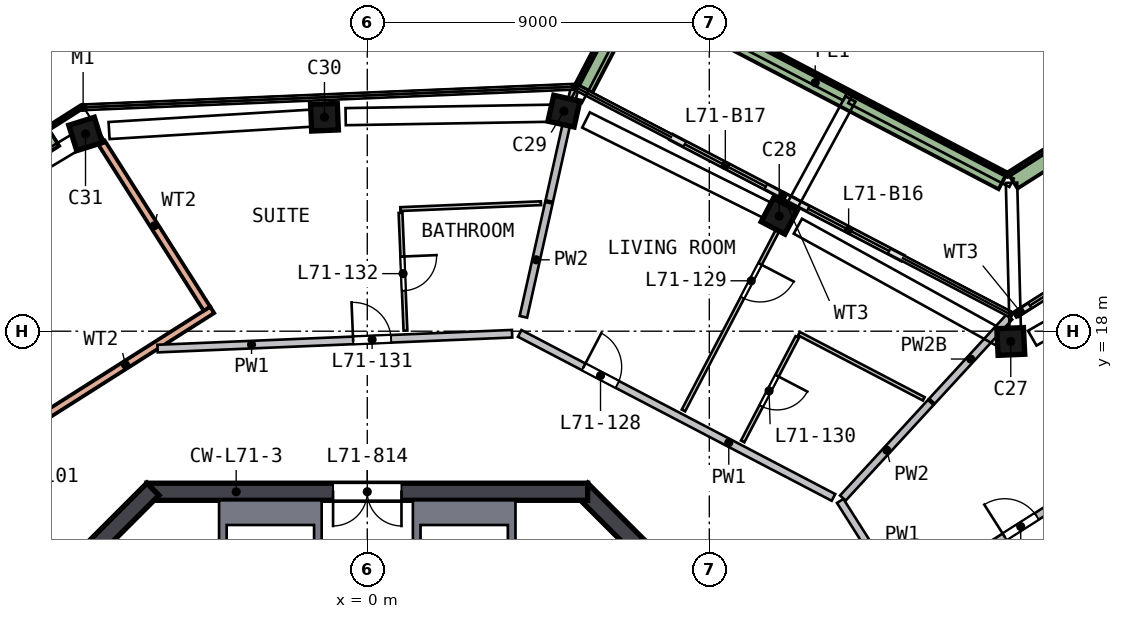
"""IFC4 building model, lengths in metres.
Left out: names, types, materials, properties, quantities, classifications, styles, units other than length and angle.
Written with IfcOpenShell. Run it as: python <this file> out.ifc"""

import sys

from ifc_helpers import new_model, si_unit, direction, frame, frame_2d, origin, origin_2d, place, context, subcontext, project, spatial, polyline, rectangle, outline, extrude, element, fill, save


model = new_model("IFC4")
c1 = context("Model", 3, precision=1e-05, world=origin(), true_north=direction((0.0, 1.0)))
c2 = subcontext(c1, "Body", "Model", "MODEL_VIEW")
j1 = project(units=[si_unit("LENGTHUNIT", "METRE"), si_unit("PLANEANGLEUNIT", "RADIAN")], contexts=[c1])
p1 = place(None, origin())
s1 = spatial("IfcSite", under=j1, at=p1, CompositionType="ELEMENT")
p2 = place(p1, origin())
s2 = spatial("IfcBuilding", under=s1, at=p2, CompositionType="ELEMENT")
p3 = place(p2, frame((0.0, 0.0, 288.0)))
s3 = spatial("IfcBuildingStorey", under=s2, at=p3, CompositionType="ELEMENT", Elevation=288.0)
p4 = place(p3, frame((17.035, 17.633, 0.0), z_axis=(-0.084526714, 0.08019396, 0.993188886), x_axis=(0.995518413, 0.049217624, 0.080750948)))
e1 = element("IfcColumn", 1, at=p4, inside=s3, PredefinedType="COLUMN", context=c2, shape_type="SweptSolid", body=[
    extrude(rectangle(XDim=0.7, YDim=0.7, at=origin_2d()), origin(), (0.0, 0.0, 1.0), 3.212),
])
p5 = place(p3, frame((10.961, 20.966, 0.0), z_axis=(-0.100155575, 0.051332584, 0.993646731), x_axis=(-0.880391875, 0.460700416, -0.112540095)))
e2 = element("IfcColumn", 2, at=p5, inside=s3, PredefinedType="COLUMN", context=c2, shape_type="SweptSolid", body=[
    extrude(rectangle(XDim=0.7, YDim=0.7, at=origin_2d()), origin(), (0.0, 0.0, 1.0), 3.21),
])
p6 = place(p3, frame((5.311, 23.762, 0.0), z_axis=(-0.113193738, 0.024250371, 0.993276949), x_axis=(0.969436955, -0.216314681, 0.115758152)))
e3 = element("IfcColumn", 3, at=p6, inside=s3, PredefinedType="COLUMN", context=c2, shape_type="SweptSolid", body=[
    extrude(rectangle(XDim=0.7, YDim=0.7, at=origin_2d()), origin(), (0.0, 0.0, 1.0), 3.211),
])
p7 = place(p3, frame((-0.991, 23.638, 0.0), z_axis=(-0.112399349, -0.005703621, 0.993646746), x_axis=(-0.992761931, -0.041934524, -0.112539968)))
e4 = element("IfcColumn", 4, at=p7, inside=s3, PredefinedType="COLUMN", context=c2, shape_type="SweptSolid", body=[
    extrude(rectangle(XDim=0.7, YDim=0.7, at=origin_2d()), origin(), (0.0, 0.0, 1.0), 3.21),
])
p8 = place(p3, frame((-7.281, 23.234, 0.0), z_axis=(-0.110228117, -0.035577075, 0.993269366), x_axis=(0.947810585, 0.297052323, 0.115823193)))
e5 = element("IfcColumn", 5, at=p8, inside=s3, PredefinedType="COLUMN", context=c2, shape_type="SweptSolid", body=[
    extrude(rectangle(XDim=0.7, YDim=0.7, at=origin_2d()), origin(), (0.0, 0.0, 1.0), 3.212),
])
p9 = place(p3, frame((13.841, 5.64, 0.0), z_axis=(0.0, 0.0, 1.0), x_axis=(-0.707106781, 0.707106781, 0.0)))
e6 = element("IfcWall", 6, at=p9, inside=s3, PredefinedType="SHEAR", context=c2, shape_type="SweptSolid", body=[
    extrude(rectangle(XDim=11.598, YDim=0.45, at=frame_2d((5.799, 0.0))), origin(), (0.0, 0.0, 1.0), 3.5),
])
p10 = place(p9, frame((2.099, 0.0, 0.0)))
e7 = element("IfcOpeningElement", 7, at=p10, cuts=e6, PredefinedType="OPENING", context=c2, shape_type="SweptSolid", body=[
    extrude(rectangle(XDim=1.2, YDim=2.1, at=frame_2d((0.6, 1.05))), frame((0.0, 0.235, 0.0), z_axis=(0.0, -1.0, 0.0), x_axis=(1.0, 0.0, 0.0)), (0.0, 0.0, 1.0), 0.47),
])
p11 = place(p3, frame((5.799, 13.775, 0.0), z_axis=(0.0, 0.0, 1.0), x_axis=(-1.0, 0.0, 0.0)))
e8 = element("IfcWall", 8, at=p11, inside=s3, PredefinedType="SHEAR", context=c2, shape_type="SweptSolid", body=[
    extrude(rectangle(XDim=11.598, YDim=0.45, at=frame_2d((5.799, 0.0))), origin(), (0.0, 0.0, 1.0), 3.5),
])
p12 = place(p11, frame((4.899, 0.0, 0.0)))
e9 = element("IfcOpeningElement", 9, at=p12, cuts=e8, PredefinedType="OPENING", context=c2, shape_type="SweptSolid", body=[
    extrude(rectangle(XDim=1.8, YDim=2.1, at=frame_2d((0.9, 1.05))), frame((0.0, 0.235, 0.0), z_axis=(0.0, -1.0, 0.0), x_axis=(1.0, 0.0, 0.0)), (0.0, 0.0, 1.0), 0.47),
])
p13 = place(p3, frame((-5.64, 13.841, 0.0), z_axis=(0.0, 0.0, 1.0), x_axis=(-0.707106781, -0.707106781, 0.0)))
e10 = element("IfcWall", 10, at=p13, inside=s3, PredefinedType="SHEAR", context=c2, shape_type="SweptSolid", body=[
    extrude(rectangle(XDim=11.598, YDim=0.45, at=frame_2d((5.799, 0.0))), origin(), (0.0, 0.0, 1.0), 3.5),
])
p14 = place(p3, frame((19.8, 20.175, 0.0), z_axis=(0.0, 0.0, 1.0), x_axis=(-0.844339377, -0.535808751, 0.0)))
e11 = element("IfcWall", 11, at=p14, inside=s3, PredefinedType="SOLIDWALL", context=c2, shape_type="SweptSolid", body=[
    extrude(rectangle(XDim=3.2, YDim=0.15, at=frame_2d((1.6, 0.0))), origin(), (0.0, 0.0, 1.0), 2.525),
])
p15 = place(p14, frame((0.4, 0.0, 0.0)))
e12 = element("IfcOpeningElement", 12, at=p15, cuts=e11, PredefinedType="OPENING", context=c2, shape_type="SweptSolid", body=[
    extrude(rectangle(XDim=2.4, YDim=2.4, at=frame_2d((1.2, 1.2))), frame((0.0, 0.085, 0.0), z_axis=(0.0, -1.0, 0.0), x_axis=(1.0, 0.0, 0.0)), (0.0, 0.0, 1.0), 0.17),
])
p16 = place(p3, frame((14.084, 19.926, 0.0), z_axis=(0.0, 0.0, 1.0), x_axis=(-0.886182685, 0.463336001, 0.0)))
e13 = element("IfcWall", 13, at=p16, inside=s3, PredefinedType="SOLIDWALL", context=c2, shape_type="SweptSolid", body=[
    extrude(rectangle(XDim=3.25, YDim=0.15, at=frame_2d((1.625, 0.0))), origin(), (0.0, 0.0, 1.0), 2.525),
])
p17 = place(p16, frame((0.4, 0.0, 0.0)))
e14 = element("IfcOpeningElement", 14, at=p17, cuts=e13, PredefinedType="OPENING", context=c2, shape_type="SweptSolid", body=[
    extrude(rectangle(XDim=2.4, YDim=2.4, at=frame_2d((1.2, 1.2))), frame((0.0, 0.085, 0.0), z_axis=(0.0, -1.0, 0.0), x_axis=(1.0, 0.0, 0.0)), (0.0, 0.0, 1.0), 0.17),
])
p18 = place(p3, frame((11.204, 21.431, 0.0), z_axis=(0.0, 0.0, 1.0), x_axis=(-0.886209674, 0.463284377, 0.0)))
e15 = element("IfcWall", 15, at=p18, inside=s3, PredefinedType="SOLIDWALL", context=c2, shape_type="SweptSolid", body=[
    extrude(rectangle(XDim=3.611, YDim=0.15, at=frame_2d((1.806, 0.0))), origin(), (0.0, 0.0, 1.0), 2.525),
])
p19 = place(p18, frame((0.811, 0.0, 0.0)))
e16 = element("IfcOpeningElement", 16, at=p19, cuts=e15, PredefinedType="OPENING", context=c2, shape_type="SweptSolid", body=[
    extrude(rectangle(XDim=2.4, YDim=2.4, at=frame_2d((1.2, 1.2))), frame((0.0, 0.085, 0.0), z_axis=(0.0, -1.0, 0.0), x_axis=(1.0, 0.0, 0.0)), (0.0, 0.0, 1.0), 0.17),
])
p20 = place(p3, frame((27.908, 28.903, 0.0), z_axis=(0.0, 0.0, 1.0), x_axis=(-0.844324826, -0.535831679, 0.0)))
e17 = element("IfcWall", 17, at=p20, inside=s3, PredefinedType="SOLIDWALL", context=c2, shape_type="SweptSolid", body=[
    extrude(rectangle(XDim=12.945, YDim=0.5, at=frame_2d((6.472, 0.0))), origin(), (0.0, 0.0, 1.0), 0.7),
])
p21 = place(p3, frame((16.729, 21.957, 0.0), z_axis=(0.0, 0.0, 1.0), x_axis=(-0.886198889, 0.463305007, 0.0)))
e18 = element("IfcWall", 18, at=p21, inside=s3, PredefinedType="SOLIDWALL", context=c2, shape_type="SweptSolid", body=[
    extrude(rectangle(XDim=11.152, YDim=0.5, at=frame_2d((5.576, 0.0))), origin(), (0.0, 0.0, 1.0), 0.7),
])
p22 = place(p3, frame((6.951, 26.786, 0.0), z_axis=(0.0, 0.0, 1.0), x_axis=(-0.463313949, -0.886194214, 0.0)))
e19 = element("IfcWall", 19, at=p22, inside=s3, PredefinedType="SOLIDWALL", context=c2, shape_type="SweptSolid", body=[
    extrude(rectangle(XDim=2.699, YDim=0.5, at=frame_2d((1.35, 0.0))), origin(), (0.0, 0.0, 1.0), 0.7),
])
p23 = place(p3, frame((-15.057, 11.595, 0.0), z_axis=(0.0, 0.0, 1.0), x_axis=(0.844326643, 0.535828817, 0.0)))
e20 = element("IfcWall", 20, at=p23, inside=s3, PredefinedType="SOLIDWALL", context=c2, shape_type="SweptSolid", body=[
    extrude(rectangle(XDim=13.0, YDim=0.2, at=frame_2d((6.5, 0.0))), origin(), (0.0, 0.0, 1.0), 3.19),
])
p24 = place(p23, frame((5.6, 0.0, 0.0)))
e21 = element("IfcOpeningElement", 21, at=p24, cuts=e20, PredefinedType="OPENING", context=c2, shape_type="SweptSolid", body=[
    extrude(rectangle(XDim=1.8, YDim=2.4, at=frame_2d((0.9, 1.2))), frame((0.0, 0.11, 0.0), z_axis=(0.0, -1.0, 0.0), x_axis=(1.0, 0.0, 0.0)), (0.0, 0.0, 1.0), 0.22),
])
p25 = place(p3, frame((-6.989, 22.957, 0.0), z_axis=(0.0, 0.0, 1.0), x_axis=(0.535827029, -0.844327777, 0.0)))
e22 = element("IfcWall", 22, at=p25, inside=s3, PredefinedType="SOLIDWALL", context=c2, shape_type="SweptSolid", body=[
    extrude(rectangle(XDim=5.17, YDim=0.2, at=frame_2d((2.585, 0.0))), origin(), (0.0, 0.0, 1.0), 3.19),
])
p26 = place(p3, frame((-7.551, 23.88, 0.0), z_axis=(0.0, 0.0, 1.0), x_axis=(-0.844327104, -0.535828089, 0.0)))
e23 = element("IfcWall", 23, at=p26, inside=s3, PredefinedType="SOLIDWALL", context=c2, shape_type="SweptSolid", body=[
    extrude(rectangle(XDim=12.84, YDim=0.1, at=frame_2d((6.42, 0.0))), origin(), (0.0, 0.0, 1.0), 0.7),
])
p27 = place(p3, frame((-8.24, 23.087, 0.0), z_axis=(0.0, 0.0, 1.0), x_axis=(-0.844319149, -0.535840625, 0.0)))
e24 = element("IfcWall", 24, at=p27, inside=s3, PredefinedType="SOLIDWALL", context=c2, shape_type="SweptSolid", body=[
    extrude(rectangle(XDim=4.963, YDim=0.5, at=frame_2d((2.481, 0.0))), origin(), (0.0, 0.0, 1.0), 0.7),
])
p28 = place(p3, origin())
e25 = element("IfcWall", 25, at=p28, inside=s3, PredefinedType="SOLIDWALL", context=c2, shape_type="SweptSolid", body=[
    extrude(outline(polyline([(3.9, 9.9), (3.7, 9.9), (3.7, 12.9), (1.4, 12.9), (1.4, 9.9), (1.2, 9.9), (1.2, 13.55), (3.9, 13.55), (3.9, 9.9)])), origin(), (0.0, 0.0, 1.0), 3.19),
])
p29 = place(p3, origin())
e26 = element("IfcWall", 26, at=p29, inside=s3, PredefinedType="SOLIDWALL", context=c2, shape_type="SweptSolid", body=[
    extrude(outline(polyline([(-3.9, 13.55), (-1.2, 13.55), (-1.2, 9.9), (-1.4, 9.9), (-1.4, 12.9), (-3.7, 12.9), (-3.7, 9.9), (-3.9, 9.9), (-3.9, 13.55)])), origin(), (0.0, 0.0, 1.0), 3.19),
])
p30 = place(p3, frame((-5.518, 17.543, 0.0), z_axis=(0.0, 0.0, 1.0), x_axis=(0.999123302, 0.041864388, 0.0)))
e27 = element("IfcWall", 27, at=p30, inside=s3, PredefinedType="SOLIDWALL", context=c2, shape_type="SweptSolid", body=[
    extrude(rectangle(XDim=9.337, YDim=0.2, at=frame_2d((4.668, 0.0))), origin(), (0.0, 0.0, 1.0), 3.19),
])
p31 = place(p30, frame((5.15, 0.0, 0.0)))
e28 = element("IfcOpeningElement", 28, at=p31, cuts=e27, PredefinedType="OPENING", context=c2, shape_type="SweptSolid", body=[
    extrude(rectangle(XDim=1.0, YDim=2.1, at=frame_2d((0.5, 1.05))), frame((0.0, 0.11, 0.0), z_axis=(0.0, -1.0, 0.0), x_axis=(1.0, 0.0, 0.0)), (0.0, 0.0, 1.0), 0.22),
])
p32 = place(p3, frame((4.01, 17.942, 0.0), z_axis=(0.0, 0.0, 1.0), x_axis=(0.886205149, -0.463293032, 0.0)))
e29 = element("IfcWall", 29, at=p32, inside=s3, PredefinedType="SOLIDWALL", context=c2, shape_type="SweptSolid", body=[
    extrude(rectangle(XDim=9.317, YDim=0.2, at=frame_2d((4.658, 0.0))), origin(), (0.0, 0.0, 1.0), 3.19),
])
p33 = place(p32, frame((1.9, 0.0, 0.0)))
e30 = element("IfcOpeningElement", 30, at=p33, cuts=e29, PredefinedType="OPENING", context=c2, shape_type="SweptSolid", body=[
    extrude(rectangle(XDim=1.0, YDim=2.1, at=frame_2d((0.5, 1.05))), frame((0.0, 0.11, 0.0), z_axis=(0.0, -1.0, 0.0), x_axis=(1.0, 0.0, 0.0)), (0.0, 0.0, 1.0), 0.22),
])
p34 = place(p3, frame((12.444, 13.533, 0.0), z_axis=(0.0, 0.0, 1.0), x_axis=(0.535837373, -0.844321212, 0.0)))
e31 = element("IfcWall", 31, at=p34, inside=s3, PredefinedType="SOLIDWALL", context=c2, shape_type="SweptSolid", body=[
    extrude(rectangle(XDim=9.317, YDim=0.2, at=frame_2d((4.658, 0.0))), origin(), (0.0, 0.0, 1.0), 3.19),
])
p35 = place(p34, frame((3.864, 0.0, 0.0)))
e32 = element("IfcOpeningElement", 32, at=p35, cuts=e31, PredefinedType="OPENING", context=c2, shape_type="SweptSolid", body=[
    extrude(rectangle(XDim=1.8, YDim=2.1, at=frame_2d((0.9, 1.05))), frame((0.0, 0.11, 0.0), z_axis=(0.0, -1.0, 0.0), x_axis=(1.0, 0.0, 0.0)), (0.0, 0.0, 1.0), 0.22),
])
p36 = place(p3, frame((4.108, 18.378, 0.0), z_axis=(0.0, 0.0, 1.0), x_axis=(0.218115714, 0.975922915, 0.0)))
e33 = element("IfcWall", 33, at=p36, inside=s3, PredefinedType="SOLIDWALL", context=c2, shape_type="SweptSolid", body=[
    extrude(rectangle(XDim=3.075, YDim=0.2, at=frame_2d((1.537, 0.0))), origin(), (0.0, 0.0, 1.0), 3.19),
])
p37 = place(p3, frame((4.789, 21.424, 0.0), z_axis=(0.0, 0.0, 1.0), x_axis=(0.218175034, 0.975909655, 0.0)))
e34 = element("IfcWall", 34, at=p37, inside=s3, PredefinedType="SOLIDWALL", context=c2, shape_type="SweptSolid", body=[
    extrude(rectangle(XDim=3.011, YDim=0.2, at=frame_2d((1.506, 0.0))), origin(), (0.0, 0.0, 1.0), 3.19),
])
p38 = place(p3, frame((12.514, 13.609, 0.0), z_axis=(0.0, 0.0, 1.0), x_axis=(0.676846081, 0.73612457, 0.0)))
e35 = element("IfcWall", 35, at=p38, inside=s3, PredefinedType="SOLIDWALL", context=c2, shape_type="SweptSolid", body=[
    extrude(rectangle(XDim=3.418, YDim=0.2, at=frame_2d((1.709, 0.0))), origin(), (0.0, 0.0, 1.0), 3.19),
])
p39 = place(p3, frame((14.859, 16.159, 0.0), z_axis=(0.0, 0.0, 1.0), x_axis=(0.676898458, 0.736076407, 0.0)))
e36 = element("IfcWall", 36, at=p39, inside=s3, PredefinedType="SOLIDWALL", context=c2, shape_type="SweptSolid", body=[
    extrude(rectangle(XDim=3.012, YDim=0.2, at=frame_2d((1.506, 0.0))), origin(), (0.0, 0.0, 1.0), 2.69),
])
p40 = place(p3, frame((14.281, 11.011, 0.0), z_axis=(0.0, 0.0, 1.0), x_axis=(0.844321754, 0.535836519, 0.0)))
e37 = element("IfcWall", 37, at=p40, inside=s3, PredefinedType="SOLIDWALL", context=c2, shape_type="SweptSolid", body=[
    extrude(rectangle(XDim=10.252, YDim=0.2, at=frame_2d((5.126, 0.0))), origin(), (0.0, 0.0, 1.0), 3.19),
])
p41 = place(p40, frame((2.95, 0.0, 0.0)))
e38 = element("IfcOpeningElement", 38, at=p41, cuts=e37, PredefinedType="OPENING", context=c2, shape_type="SweptSolid", body=[
    extrude(rectangle(XDim=1.0, YDim=2.1, at=frame_2d((0.5, 1.05))), frame((0.0, 0.11, 0.0), z_axis=(0.0, -1.0, 0.0), x_axis=(1.0, 0.0, 0.0)), (0.0, 0.0, 1.0), 0.22),
])
p42 = place(p3, frame((24.755, 13.641, 0.0), z_axis=(0.0, 0.0, 1.0), x_axis=(-0.844332528, -0.535819543, 0.0)))
e39 = element("IfcWall", 39, at=p42, inside=s3, PredefinedType="SOLIDWALL", context=c2, shape_type="SweptSolid", body=[
    extrude(rectangle(XDim=10.252, YDim=0.2, at=frame_2d((5.126, 0.0))), origin(), (0.0, 0.0, 1.0), 3.19),
])
p43 = place(p42, frame((2.45, 0.0, 0.0)))
e40 = element("IfcOpeningElement", 40, at=p43, cuts=e39, PredefinedType="OPENING", context=c2, shape_type="SweptSolid", body=[
    extrude(rectangle(XDim=1.0, YDim=2.1, at=frame_2d((0.5, 1.05))), frame((0.0, 0.11, 0.0), z_axis=(0.0, -1.0, 0.0), x_axis=(1.0, 0.0, 0.0)), (0.0, 0.0, 1.0), 0.22),
])
p44 = place(p3, frame((0.875, 21.114, 0.0), z_axis=(0.0, 0.0, 1.0), x_axis=(0.041895869, -0.999121983, 0.0)))
e41 = element("IfcWall", 41, at=p44, inside=s3, PredefinedType="PARTITIONING", context=c2, shape_type="SweptSolid", body=[
    extrude(rectangle(XDim=3.1, YDim=0.1, at=frame_2d((1.55, 0.0))), origin(), (0.0, 0.0, 1.0), 3.19),
])
p45 = place(p44, frame((1.15, 0.0, 0.0)))
e42 = element("IfcOpeningElement", 42, at=p45, cuts=e41, PredefinedType="OPENING", context=c2, shape_type="SweptSolid", body=[
    extrude(rectangle(XDim=0.9, YDim=2.1, at=frame_2d((0.45, 1.05))), frame((0.0, 0.06, 0.0), z_axis=(0.0, -1.0, 0.0), x_axis=(1.0, 0.0, 0.0)), (0.0, 0.0, 1.0), 0.12),
])
p46 = place(p3, frame((0.871, 21.213, 0.0), z_axis=(0.0, 0.0, 1.0), x_axis=(0.99912368, 0.041855359, 0.0)))
e43 = element("IfcWall", 43, at=p46, inside=s3, PredefinedType="PARTITIONING", context=c2, shape_type="SweptSolid", body=[
    extrude(rectangle(XDim=3.704, YDim=0.1, at=frame_2d((1.852, 0.0))), origin(), (0.0, 0.0, 1.0), 3.19),
])
p47 = place(p3, frame((11.169, 21.365, 0.0), z_axis=(0.0, 0.0, 1.0), x_axis=(-0.46327405, -0.886215072, 0.0)))
e44 = element("IfcWall", 44, at=p47, inside=s3, PredefinedType="PARTITIONING", context=c2, shape_type="SweptSolid", body=[
    extrude(rectangle(XDim=6.15, YDim=0.1, at=frame_2d((3.075, 0.0))), origin(), (0.0, 0.0, 1.0), 3.19),
])
p48 = place(p47, frame((1.8, 0.0, 0.0)))
e45 = element("IfcOpeningElement", 45, at=p48, cuts=e44, PredefinedType="OPENING", context=c2, shape_type="SweptSolid", body=[
    extrude(rectangle(XDim=1.0, YDim=2.1, at=frame_2d((0.5, 1.05))), frame((0.0, 0.06, 0.0), z_axis=(0.0, -1.0, 0.0), x_axis=(1.0, 0.0, 0.0)), (0.0, 0.0, 1.0), 0.12),
])
p49 = place(p3, frame((11.314, 17.847, 0.0), z_axis=(0.0, 0.0, 1.0), x_axis=(-0.463238746, -0.886233527, 0.0)))
e46 = element("IfcWall", 46, at=p49, inside=s3, PredefinedType="PARTITIONING", context=c2, shape_type="SweptSolid", body=[
    extrude(rectangle(XDim=3.1, YDim=0.1, at=frame_2d((1.55, 0.0))), origin(), (0.0, 0.0, 1.0), 3.19),
])
p50 = place(p49, frame((1.15, 0.0, 0.0)))
e47 = element("IfcOpeningElement", 47, at=p50, cuts=e46, PredefinedType="OPENING", context=c2, shape_type="SweptSolid", body=[
    extrude(rectangle(XDim=0.9, YDim=2.1, at=frame_2d((0.45, 1.05))), frame((0.0, 0.06, 0.0), z_axis=(0.0, -1.0, 0.0), x_axis=(1.0, 0.0, 0.0)), (0.0, 0.0, 1.0), 0.12),
])
p51 = place(p3, frame((14.643, 16.22, 0.0), z_axis=(0.0, 0.0, 1.0), x_axis=(-0.886200227, 0.463302447, 0.0)))
e48 = element("IfcWall", 48, at=p51, inside=s3, PredefinedType="PARTITIONING", context=c2, shape_type="SweptSolid", body=[
    extrude(rectangle(XDim=3.704, YDim=0.1, at=frame_2d((1.852, 0.0))), origin(), (0.0, 0.0, 1.0), 3.19),
])
p52 = place(p15, origin())
e49 = element("IfcDoor", 49, at=p52, inside=s3, OperationType="SLIDING_TO_RIGHT", PredefinedType="DOOR", context=c2, shape_type="SweptSolid", body=[
    extrude(rectangle(XDim=2.4, YDim=2.4, at=frame_2d((1.2, 1.2))), frame((0.0, 0.025, 0.0), z_axis=(0.0, -1.0, 0.0), x_axis=(1.0, 0.0, 0.0)), (0.0, 0.0, 1.0), 0.05),
])
fill(e12, e49)
p53 = place(p17, origin())
e50 = element("IfcDoor", 50, at=p53, inside=s3, OperationType="SLIDING_TO_RIGHT", PredefinedType="DOOR", context=c2, shape_type="SweptSolid", body=[
    extrude(rectangle(XDim=2.4, YDim=2.4, at=frame_2d((1.2, 1.2))), frame((0.0, 0.025, 0.0), z_axis=(0.0, -1.0, 0.0), x_axis=(1.0, 0.0, 0.0)), (0.0, 0.0, 1.0), 0.05),
])
fill(e14, e50)
p54 = place(p19, origin())
e51 = element("IfcDoor", 51, at=p54, inside=s3, OperationType="SLIDING_TO_LEFT", PredefinedType="DOOR", context=c2, shape_type="SweptSolid", body=[
    extrude(rectangle(XDim=2.4, YDim=2.4, at=frame_2d((1.2, 1.2))), frame((0.0, 0.025, 0.0), z_axis=(0.0, -1.0, 0.0), x_axis=(1.0, 0.0, 0.0)), (0.0, 0.0, 1.0), 0.05),
])
fill(e16, e51)
p55 = place(p12, origin())
e52 = element("IfcDoor", 52, at=p55, inside=s3, OperationType="DOUBLE_DOOR_SINGLE_SWING", PredefinedType="DOOR", context=c2, shape_type="SweptSolid", body=[
    extrude(rectangle(XDim=1.8, YDim=2.1, at=frame_2d((0.9, 1.05))), frame((0.0, 0.025, 0.0), z_axis=(0.0, -1.0, 0.0), x_axis=(1.0, 0.0, 0.0)), (0.0, 0.0, 1.0), 0.05),
])
fill(e9, e52)
p56 = place(p41, origin())
e53 = element("IfcDoor", 53, at=p56, inside=s3, OperationType="SINGLE_SWING_LEFT", PredefinedType="DOOR", context=c2, shape_type="SweptSolid", body=[
    extrude(rectangle(XDim=1.0, YDim=2.1, at=frame_2d((0.5, 1.05))), frame((0.0, 0.025, 0.0), z_axis=(0.0, -1.0, 0.0), x_axis=(1.0, 0.0, 0.0)), (0.0, 0.0, 1.0), 0.05),
])
fill(e38, e53)
p57 = place(p33, origin())
e54 = element("IfcDoor", 54, at=p57, inside=s3, OperationType="SINGLE_SWING_LEFT", PredefinedType="DOOR", context=c2, shape_type="SweptSolid", body=[
    extrude(rectangle(XDim=1.0, YDim=2.1, at=frame_2d((0.5, 1.05))), frame((0.0, 0.025, 0.0), z_axis=(0.0, -1.0, 0.0), x_axis=(1.0, 0.0, 0.0)), (0.0, 0.0, 1.0), 0.05),
])
fill(e30, e54)
p58 = place(p48, origin())
e55 = element("IfcDoor", 55, at=p58, inside=s3, OperationType="SINGLE_SWING_LEFT", PredefinedType="DOOR", context=c2, shape_type="SweptSolid", body=[
    extrude(rectangle(XDim=1.0, YDim=2.1, at=frame_2d((0.5, 1.05))), frame((0.0, 0.025, 0.0), z_axis=(0.0, -1.0, 0.0), x_axis=(1.0, 0.0, 0.0)), (0.0, 0.0, 1.0), 0.05),
])
fill(e45, e55)
p59 = place(p50, origin())
e56 = element("IfcDoor", 56, at=p59, inside=s3, OperationType="SINGLE_SWING_LEFT", PredefinedType="DOOR", context=c2, shape_type="SweptSolid", body=[
    extrude(rectangle(XDim=0.9, YDim=2.1, at=frame_2d((0.45, 1.05))), frame((0.0, 0.025, 0.0), z_axis=(0.0, -1.0, 0.0), x_axis=(1.0, 0.0, 0.0)), (0.0, 0.0, 1.0), 0.05),
])
fill(e47, e56)
p60 = place(p31, origin())
e57 = element("IfcDoor", 57, at=p60, inside=s3, OperationType="SINGLE_SWING_LEFT", PredefinedType="DOOR", context=c2, shape_type="SweptSolid", body=[
    extrude(rectangle(XDim=1.0, YDim=2.1, at=frame_2d((0.5, 1.05))), frame((0.0, 0.025, 0.0), z_axis=(0.0, -1.0, 0.0), x_axis=(1.0, 0.0, 0.0)), (0.0, 0.0, 1.0), 0.05),
])
fill(e28, e57)
p61 = place(p45, origin())
e58 = element("IfcDoor", 58, at=p61, inside=s3, OperationType="SINGLE_SWING_LEFT", PredefinedType="DOOR", context=c2, shape_type="SweptSolid", body=[
    extrude(rectangle(XDim=0.9, YDim=2.1, at=frame_2d((0.45, 1.05))), frame((0.0, 0.025, 0.0), z_axis=(0.0, -1.0, 0.0), x_axis=(1.0, 0.0, 0.0)), (0.0, 0.0, 1.0), 0.05),
])
fill(e42, e58)
save(model, sys.argv[1])
